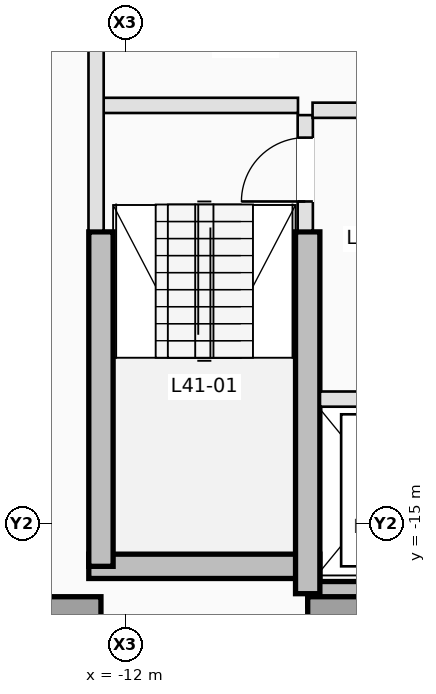
"""IFC4 building model, lengths in metres.
Left out: names, types, materials, properties, quantities, classifications, styles, units other than length and angle.
Written with IfcOpenShell. Run it as: python <this file> out.ifc"""

import sys

from ifc_helpers import new_model, si_unit, direction, frame, frame_2d, origin, origin_2d, place, context, subcontext, project, spatial, rectangle, extrude, element, fill, save


model = new_model("IFC4")
c1 = context("Model", 3, precision=1e-05, world=origin(), true_north=direction((0.0, 1.0)))
c2 = subcontext(c1, "Body", "Model", "MODEL_VIEW")
j1 = project(units=[si_unit("LENGTHUNIT", "METRE"), si_unit("PLANEANGLEUNIT", "RADIAN")], contexts=[c1])
p1 = place(None, origin())
s1 = spatial("IfcSite", under=j1, at=p1, CompositionType="ELEMENT")
p2 = place(p1, origin())
s2 = spatial("IfcBuilding", under=s1, at=p2, CompositionType="ELEMENT")
p3 = place(p2, frame((0.0, 0.0, 151.0)))
s3 = spatial("IfcBuildingStorey", under=s2, at=p3, CompositionType="ELEMENT", Elevation=151.0)
p4 = place(p3, frame((-12.6, -15.7, 0.0), z_axis=(0.0, 0.0, 1.0), x_axis=(1.0, 0.0, 0.0)))
e1 = element("IfcWall", 1, at=p4, inside=s3, PredefinedType="SHEAR", context=c2, shape_type="SweptSolid", body=[
    extrude(rectangle(XDim=3.8, YDim=0.4, at=frame_2d((1.9, 0.0))), origin(), (0.0, 0.0, 1.0), 3.5),
])
p5 = place(p3, frame((-9.0, -16.15, 0.0), z_axis=(0.0, 0.0, 1.0), x_axis=(1.0, 0.0, 0.0)))
e2 = element("IfcWall", 2, at=p5, inside=s3, PredefinedType="SHEAR", context=c2, shape_type="SweptSolid", body=[
    extrude(rectangle(XDim=5.25, YDim=0.4, at=frame_2d((2.625, 0.0))), origin(), (0.0, 0.0, 1.0), 3.5),
])
p6 = place(p3, frame((-12.4, -15.7, 0.0), z_axis=(0.0, 0.0, 1.0), x_axis=(0.0, 1.0, 0.0)))
e3 = element("IfcWall", 3, at=p6, inside=s3, PredefinedType="SHEAR", context=c2, shape_type="SweptSolid", body=[
    extrude(rectangle(XDim=5.5, YDim=0.4, at=frame_2d((2.75, 0.0))), origin(), (0.0, 0.0, 1.0), 3.5),
])
p7 = place(p3, frame((-9.0, -16.15, 0.0), z_axis=(0.0, 0.0, 1.0), x_axis=(0.0, 1.0, 0.0)))
e4 = element("IfcWall", 4, at=p7, inside=s3, PredefinedType="SHEAR", context=c2, shape_type="SweptSolid", body=[
    extrude(rectangle(XDim=5.95, YDim=0.4, at=frame_2d((2.975, 0.0))), origin(), (0.0, 0.0, 1.0), 3.5),
])
for number, where, z_axis, x_axis in (
    (5, (-12.95, -16.75, 0.0), (0.0, 0.0, 1.0), (1.0, 0.0, 0.0)),
    (6, (-8.45, -16.75, 0.0), (0.0, 0.0, 1.0), (1.0, 0.0, 0.0)),
):
    element("IfcColumn", number, at=place(p3, frame(where, z_axis=z_axis, x_axis=x_axis)), inside=s3, PredefinedType="COLUMN", context=c2, shape_type="SweptSolid", body=[
        extrude(rectangle(XDim=1.1, YDim=1.1, at=origin_2d()), origin(), (0.0, 0.0, 1.0), 3.5),
    ])
p8 = place(p3, frame((-9.04, -10.18, 0.0), z_axis=(0.0, 0.0, 1.0), x_axis=(0.0, 1.0, 0.0)))
e7 = element("IfcWall", 7, at=p8, inside=s3, PredefinedType="PARTITIONING", context=c2, shape_type="SweptSolid", body=[
    extrude(rectangle(XDim=1.9, YDim=0.25, at=frame_2d((0.95, 0.0))), origin(), (0.0, 0.0, 1.0), 3.25),
])
p9 = place(p8, frame((0.48, 0.0, 0.0)))
e8 = element("IfcOpeningElement", 8, at=p9, cuts=e7, PredefinedType="OPENING", context=c2, shape_type="SweptSolid", body=[
    extrude(rectangle(XDim=1.05, YDim=2.15, at=frame_2d((0.525, 1.075))), frame((0.0, 0.135, 0.0), z_axis=(0.0, -1.0, 0.0), x_axis=(1.0, 0.0, 0.0)), (0.0, 0.0, 1.0), 0.27),
])
p10 = place(p3, frame((-12.38, -8.12, 0.0), z_axis=(0.0, 0.0, 1.0), x_axis=(1.0, 0.0, 0.0)))
e9 = element("IfcWall", 9, at=p10, inside=s3, PredefinedType="PARTITIONING", context=c2, shape_type="SweptSolid", body=[
    extrude(rectangle(XDim=3.22, YDim=0.25, at=frame_2d((1.61, 0.0))), origin(), (0.0, 0.0, 1.0), 3.25),
])
p11 = place(p3, frame((-12.48, -10.18, 0.0), z_axis=(0.0, 0.0, 1.0), x_axis=(0.0, 1.0, 0.0)))
e10 = element("IfcWall", 10, at=p11, inside=s3, PredefinedType="PARTITIONING", context=c2, shape_type="SweptSolid", body=[
    extrude(rectangle(XDim=4.828, YDim=0.25, at=frame_2d((2.414, 0.0))), origin(), (0.0, 0.0, 1.0), 3.25),
])
p12 = place(p3, frame((-8.798, -12.95, 0.0), z_axis=(0.0, 0.0, 1.0), x_axis=(1.0, 0.0, 0.0)))
e11 = element("IfcWall", 11, at=p12, inside=s3, PredefinedType="PARTITIONING", context=c2, shape_type="SweptSolid", body=[
    extrude(rectangle(XDim=5.118, YDim=0.25, at=frame_2d((2.559, 0.0))), origin(), (0.0, 0.0, 1.0), 3.25),
])
p13 = place(p12, frame((0.698, 0.0, 0.0)))
e12 = element("IfcOpeningElement", 12, at=p13, cuts=e11, PredefinedType="OPENING", context=c2, shape_type="SweptSolid", body=[
    extrude(rectangle(XDim=1.1, YDim=2.15, at=frame_2d((0.55, 1.075))), frame((0.0, 0.135, 0.0), z_axis=(0.0, -1.0, 0.0), x_axis=(1.0, 0.0, 0.0)), (0.0, 0.0, 1.0), 0.27),
])
p14 = place(p12, frame((2.598, 0.0, 0.0)))
e13 = element("IfcOpeningElement", 13, at=p14, cuts=e11, PredefinedType="OPENING", context=c2, shape_type="SweptSolid", body=[
    extrude(rectangle(XDim=0.88, YDim=2.1, at=frame_2d((0.44, 1.05))), frame((0.0, 0.135, 0.0), z_axis=(0.0, -1.0, 0.0), x_axis=(1.0, 0.0, 0.0)), (0.0, 0.0, 1.0), 0.27),
])
p15 = place(p12, frame((3.998, 0.0, 0.0)))
e14 = element("IfcOpeningElement", 14, at=p15, cuts=e11, PredefinedType="OPENING", context=c2, shape_type="SweptSolid", body=[
    extrude(rectangle(XDim=0.88, YDim=2.1, at=frame_2d((0.44, 1.05))), frame((0.0, 0.135, 0.0), z_axis=(0.0, -1.0, 0.0), x_axis=(1.0, 0.0, 0.0)), (0.0, 0.0, 1.0), 0.27),
])
p16 = place(p3, frame((-8.92, -8.2, 0.0), z_axis=(0.0, 0.0, 1.0), x_axis=(1.0, 0.0, 0.0)))
e15 = element("IfcWall", 15, at=p16, inside=s3, PredefinedType="PARTITIONING", context=c2, shape_type="SweptSolid", body=[
    extrude(rectangle(XDim=5.24, YDim=0.25, at=frame_2d((2.62, 0.0))), origin(), (0.0, 0.0, 1.0), 3.25),
])
p17 = place(p9, origin())
e16 = element("IfcDoor", 16, at=p17, inside=s3, OperationType="SINGLE_SWING_LEFT", PredefinedType="DOOR", context=c2, shape_type="SweptSolid", body=[
    extrude(rectangle(XDim=1.05, YDim=2.15, at=frame_2d((0.525, 1.075))), frame((0.0, 0.025, 0.0), z_axis=(0.0, -1.0, 0.0), x_axis=(1.0, 0.0, 0.0)), (0.0, 0.0, 1.0), 0.05),
])
fill(e8, e16)
save(model, sys.argv[1])
